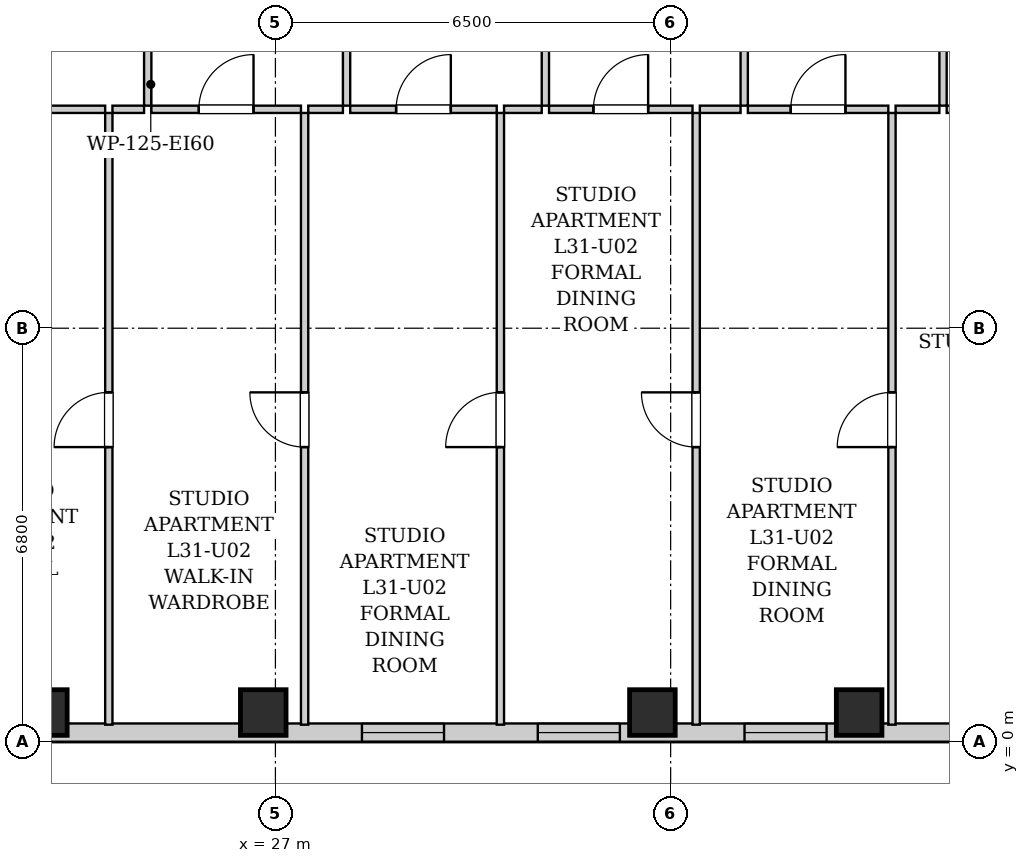
"""IFC4 building model, lengths in metres.
Left out: names, types, materials, properties, quantities, classifications, styles, units other than length and angle.
Written with IfcOpenShell. Run it as: python <this file> out.ifc"""

import sys

from ifc_helpers import new_model, si_unit, direction, frame, frame_2d, origin, origin_2d, place, context, subcontext, project, spatial, rectangle, extrude, element, fill, save


model = new_model("IFC4")
c1 = context("Model", 3, precision=1e-05, world=origin(), true_north=direction((0.0, 1.0)))
c2 = subcontext(c1, "Body", "Model", "MODEL_VIEW")
j1 = project(units=[si_unit("LENGTHUNIT", "METRE"), si_unit("PLANEANGLEUNIT", "RADIAN")], contexts=[c1])
p1 = place(None, origin())
s1 = spatial("IfcSite", under=j1, at=p1, CompositionType="ELEMENT")
p2 = place(p1, origin())
s2 = spatial("IfcBuilding", under=s1, at=p2, CompositionType="ELEMENT")
p3 = place(p2, frame((0.0, 0.0, 110.3)))
s3 = spatial("IfcBuildingStorey", under=s2, at=p3, CompositionType="ELEMENT", Elevation=110.3)
for number, where, z_axis, x_axis in (
    (1, (23.2, 0.48, 0.0), (0.0, 0.0, 1.0), (1.0, 0.0, 0.0)),
    (2, (26.8, 0.48, 0.0), (0.0, 0.0, 1.0), (1.0, 0.0, 0.0)),
    (3, (33.2, 0.48, 0.0), (0.0, 0.0, 1.0), (1.0, 0.0, 0.0)),
    (4, (36.6, 0.48, 0.0), (0.0, 0.0, 1.0), (1.0, 0.0, 0.0)),
):
    element("IfcColumn", number, at=place(p3, frame(where, z_axis=z_axis, x_axis=x_axis)), inside=s3, PredefinedType="COLUMN", context=c2, shape_type="SweptSolid", body=[
        extrude(rectangle(XDim=0.75, YDim=0.75, at=origin_2d()), origin(), (0.0, 0.0, 1.0), 3.2),
    ])
p4 = place(p3, frame((40.9, 0.15, 0.0), z_axis=(0.0, 0.0, 1.0), x_axis=(-1.0, 0.0, 0.0)))
e5 = element("IfcWall", 5, at=p4, inside=s3, PredefinedType="SOLIDWALL", context=c2, shape_type="SweptSolid", body=[
    extrude(rectangle(XDim=21.95, YDim=0.3, at=frame_2d((10.975, 0.0))), origin(), (0.0, 0.0, 1.0), 2.94),
])
p5 = place(p4, frame((20.08, 0.0, 0.55)))
e6 = element("IfcOpeningElement", 6, at=p5, cuts=e5, PredefinedType="OPENING", context=c2, shape_type="SweptSolid", body=[
    extrude(rectangle(XDim=1.35, YDim=1.2, at=frame_2d((0.675, 0.6))), frame((0.0, 0.16, 0.0), z_axis=(0.0, -1.0, 0.0), x_axis=(1.0, 0.0, 0.0)), (0.0, 0.0, 1.0), 0.32),
])
p6 = place(p4, frame((18.4, 0.0, 0.55)))
e7 = element("IfcOpeningElement", 7, at=p6, cuts=e5, PredefinedType="OPENING", context=c2, shape_type="SweptSolid", body=[
    extrude(rectangle(XDim=0.85, YDim=1.2, at=frame_2d((0.425, 0.6))), frame((0.0, 0.16, 0.0), z_axis=(0.0, -1.0, 0.0), x_axis=(1.0, 0.0, 0.0)), (0.0, 0.0, 1.0), 0.32),
])
p7 = place(p4, frame((11.127, 0.0, 0.55)))
e8 = element("IfcOpeningElement", 8, at=p7, cuts=e5, PredefinedType="OPENING", context=c2, shape_type="SweptSolid", body=[
    extrude(rectangle(XDim=1.35, YDim=1.2, at=frame_2d((0.675, 0.6))), frame((0.0, 0.16, 0.0), z_axis=(0.0, -1.0, 0.0), x_axis=(1.0, 0.0, 0.0)), (0.0, 0.0, 1.0), 0.32),
])
p8 = place(p4, frame((8.235, 0.0, 0.55)))
e9 = element("IfcOpeningElement", 9, at=p8, cuts=e5, PredefinedType="OPENING", context=c2, shape_type="SweptSolid", body=[
    extrude(rectangle(XDim=1.35, YDim=1.2, at=frame_2d((0.675, 0.6))), frame((0.0, 0.16, 0.0), z_axis=(0.0, -1.0, 0.0), x_axis=(1.0, 0.0, 0.0)), (0.0, 0.0, 1.0), 0.32),
])
p9 = place(p4, frame((4.835, 0.0, 0.55)))
e10 = element("IfcOpeningElement", 10, at=p9, cuts=e5, PredefinedType="OPENING", context=c2, shape_type="SweptSolid", body=[
    extrude(rectangle(XDim=1.35, YDim=1.2, at=frame_2d((0.675, 0.6))), frame((0.0, 0.16, 0.0), z_axis=(0.0, -1.0, 0.0), x_axis=(1.0, 0.0, 0.0)), (0.0, 0.0, 1.0), 0.32),
])
p10 = place(p3, frame((24.9, 10.46, 0.0), z_axis=(0.0, 0.0, 1.0), x_axis=(0.0, 1.0, 0.0)))
e11 = element("IfcWall", 11, at=p10, inside=s3, PredefinedType="PARTITIONING", context=c2, shape_type="SweptSolid", body=[
    extrude(rectangle(XDim=2.85, YDim=0.12, at=frame_2d((1.425, 0.0))), origin(), (0.0, 0.0, 1.0), 2.94),
])
p11 = place(p10, frame((0.975, 0.0, 0.0)))
e12 = element("IfcOpeningElement", 12, at=p11, cuts=e11, PredefinedType="OPENING", context=c2, shape_type="SweptSolid", body=[
    extrude(rectangle(XDim=0.9, YDim=2.05, at=frame_2d((0.45, 1.025))), frame((0.0, 0.07, 0.0), z_axis=(0.0, -1.0, 0.0), x_axis=(1.0, 0.0, 0.0)), (0.0, 0.0, 1.0), 0.14),
])
p12 = place(p3, frame((21.1, 10.4, 0.0), z_axis=(0.0, 0.0, 1.0), x_axis=(1.0, 0.0, 0.0)))
e13 = element("IfcWall", 13, at=p12, inside=s3, PredefinedType="PARTITIONING", context=c2, shape_type="SweptSolid", body=[
    extrude(rectangle(XDim=3.1, YDim=0.12, at=frame_2d((1.55, 0.0))), origin(), (0.0, 0.0, 1.0), 2.94),
])
p13 = place(p12, frame((1.1, 0.0, 0.0)))
e14 = element("IfcOpeningElement", 14, at=p13, cuts=e13, PredefinedType="OPENING", context=c2, shape_type="SweptSolid", body=[
    extrude(rectangle(XDim=0.9, YDim=2.05, at=frame_2d((0.45, 1.025))), frame((0.0, 0.07, 0.0), z_axis=(0.0, -1.0, 0.0), x_axis=(1.0, 0.0, 0.0)), (0.0, 0.0, 1.0), 0.14),
])
p14 = place(p3, frame((24.32, 10.4, 0.0), z_axis=(0.0, 0.0, 1.0), x_axis=(1.0, 0.0, 0.0)))
e15 = element("IfcWall", 15, at=p14, inside=s3, PredefinedType="PARTITIONING", context=c2, shape_type="SweptSolid", body=[
    extrude(rectangle(XDim=0.52, YDim=0.12, at=frame_2d((0.26, 0.0))), origin(), (0.0, 0.0, 1.0), 2.94),
])
p15 = place(p3, frame((28.17, 10.46, 0.0), z_axis=(0.0, 0.0, 1.0), x_axis=(0.0, 1.0, 0.0)))
e16 = element("IfcWall", 16, at=p15, inside=s3, PredefinedType="PARTITIONING", context=c2, shape_type="SweptSolid", body=[
    extrude(rectangle(XDim=2.85, YDim=0.12, at=frame_2d((1.425, 0.0))), origin(), (0.0, 0.0, 1.0), 2.94),
])
p16 = place(p15, frame((0.975, 0.0, 0.0)))
e17 = element("IfcOpeningElement", 17, at=p16, cuts=e16, PredefinedType="OPENING", context=c2, shape_type="SweptSolid", body=[
    extrude(rectangle(XDim=0.9, YDim=2.05, at=frame_2d((0.45, 1.025))), frame((0.0, 0.07, 0.0), z_axis=(0.0, -1.0, 0.0), x_axis=(1.0, 0.0, 0.0)), (0.0, 0.0, 1.0), 0.14),
])
p17 = place(p3, frame((24.96, 10.4, 0.0), z_axis=(0.0, 0.0, 1.0), x_axis=(1.0, 0.0, 0.0)))
e18 = element("IfcWall", 18, at=p17, inside=s3, PredefinedType="PARTITIONING", context=c2, shape_type="SweptSolid", body=[
    extrude(rectangle(XDim=2.46, YDim=0.12, at=frame_2d((1.23, 0.0))), origin(), (0.0, 0.0, 1.0), 2.94),
])
p18 = place(p17, frame((0.78, 0.0, 0.0)))
e19 = element("IfcOpeningElement", 19, at=p18, cuts=e18, PredefinedType="OPENING", context=c2, shape_type="SweptSolid", body=[
    extrude(rectangle(XDim=0.9, YDim=2.05, at=frame_2d((0.45, 1.025))), frame((0.0, 0.07, 0.0), z_axis=(0.0, -1.0, 0.0), x_axis=(1.0, 0.0, 0.0)), (0.0, 0.0, 1.0), 0.14),
])
p19 = place(p3, frame((27.54, 10.4, 0.0), z_axis=(0.0, 0.0, 1.0), x_axis=(1.0, 0.0, 0.0)))
e20 = element("IfcWall", 20, at=p19, inside=s3, PredefinedType="PARTITIONING", context=c2, shape_type="SweptSolid", body=[
    extrude(rectangle(XDim=0.57, YDim=0.12, at=frame_2d((0.285, 0.0))), origin(), (0.0, 0.0, 1.0), 2.94),
])
p20 = place(p3, frame((31.44, 10.46, 0.0), z_axis=(0.0, 0.0, 1.0), x_axis=(0.0, 1.0, 0.0)))
e21 = element("IfcWall", 21, at=p20, inside=s3, PredefinedType="PARTITIONING", context=c2, shape_type="SweptSolid", body=[
    extrude(rectangle(XDim=2.85, YDim=0.12, at=frame_2d((1.425, 0.0))), origin(), (0.0, 0.0, 1.0), 2.94),
])
p21 = place(p20, frame((0.975, 0.0, 0.0)))
e22 = element("IfcOpeningElement", 22, at=p21, cuts=e21, PredefinedType="OPENING", context=c2, shape_type="SweptSolid", body=[
    extrude(rectangle(XDim=0.9, YDim=2.05, at=frame_2d((0.45, 1.025))), frame((0.0, 0.07, 0.0), z_axis=(0.0, -1.0, 0.0), x_axis=(1.0, 0.0, 0.0)), (0.0, 0.0, 1.0), 0.14),
])
p22 = place(p3, frame((28.23, 10.4, 0.0), z_axis=(0.0, 0.0, 1.0), x_axis=(1.0, 0.0, 0.0)))
e23 = element("IfcWall", 23, at=p22, inside=s3, PredefinedType="PARTITIONING", context=c2, shape_type="SweptSolid", body=[
    extrude(rectangle(XDim=2.41, YDim=0.12, at=frame_2d((1.205, 0.0))), origin(), (0.0, 0.0, 1.0), 2.94),
])
p23 = place(p22, frame((0.755, 0.0, 0.0)))
e24 = element("IfcOpeningElement", 24, at=p23, cuts=e23, PredefinedType="OPENING", context=c2, shape_type="SweptSolid", body=[
    extrude(rectangle(XDim=0.9, YDim=2.05, at=frame_2d((0.45, 1.025))), frame((0.0, 0.07, 0.0), z_axis=(0.0, -1.0, 0.0), x_axis=(1.0, 0.0, 0.0)), (0.0, 0.0, 1.0), 0.14),
])
p24 = place(p3, frame((30.76, 10.4, 0.0), z_axis=(0.0, 0.0, 1.0), x_axis=(1.0, 0.0, 0.0)))
e25 = element("IfcWall", 25, at=p24, inside=s3, PredefinedType="PARTITIONING", context=c2, shape_type="SweptSolid", body=[
    extrude(rectangle(XDim=0.62, YDim=0.12, at=frame_2d((0.31, 0.0))), origin(), (0.0, 0.0, 1.0), 2.94),
])
p25 = place(p3, frame((34.71, 10.46, 0.0), z_axis=(0.0, 0.0, 1.0), x_axis=(0.0, 1.0, 0.0)))
e26 = element("IfcWall", 26, at=p25, inside=s3, PredefinedType="PARTITIONING", context=c2, shape_type="SweptSolid", body=[
    extrude(rectangle(XDim=2.85, YDim=0.12, at=frame_2d((1.425, 0.0))), origin(), (0.0, 0.0, 1.0), 2.94),
])
p26 = place(p25, frame((0.975, 0.0, 0.0)))
e27 = element("IfcOpeningElement", 27, at=p26, cuts=e26, PredefinedType="OPENING", context=c2, shape_type="SweptSolid", body=[
    extrude(rectangle(XDim=0.9, YDim=2.05, at=frame_2d((0.45, 1.025))), frame((0.0, 0.07, 0.0), z_axis=(0.0, -1.0, 0.0), x_axis=(1.0, 0.0, 0.0)), (0.0, 0.0, 1.0), 0.14),
])
p27 = place(p3, frame((31.5, 10.4, 0.0), z_axis=(0.0, 0.0, 1.0), x_axis=(1.0, 0.0, 0.0)))
e28 = element("IfcWall", 28, at=p27, inside=s3, PredefinedType="PARTITIONING", context=c2, shape_type="SweptSolid", body=[
    extrude(rectangle(XDim=2.36, YDim=0.12, at=frame_2d((1.18, 0.0))), origin(), (0.0, 0.0, 1.0), 2.94),
])
p28 = place(p27, frame((0.73, 0.0, 0.0)))
e29 = element("IfcOpeningElement", 29, at=p28, cuts=e28, PredefinedType="OPENING", context=c2, shape_type="SweptSolid", body=[
    extrude(rectangle(XDim=0.9, YDim=2.05, at=frame_2d((0.45, 1.025))), frame((0.0, 0.07, 0.0), z_axis=(0.0, -1.0, 0.0), x_axis=(1.0, 0.0, 0.0)), (0.0, 0.0, 1.0), 0.14),
])
p29 = place(p3, frame((33.98, 10.4, 0.0), z_axis=(0.0, 0.0, 1.0), x_axis=(1.0, 0.0, 0.0)))
e30 = element("IfcWall", 30, at=p29, inside=s3, PredefinedType="PARTITIONING", context=c2, shape_type="SweptSolid", body=[
    extrude(rectangle(XDim=0.67, YDim=0.12, at=frame_2d((0.335, 0.0))), origin(), (0.0, 0.0, 1.0), 2.94),
])
p30 = place(p3, frame((37.98, 10.46, 0.0), z_axis=(0.0, 0.0, 1.0), x_axis=(0.0, 1.0, 0.0)))
e31 = element("IfcWall", 31, at=p30, inside=s3, PredefinedType="PARTITIONING", context=c2, shape_type="SweptSolid", body=[
    extrude(rectangle(XDim=2.85, YDim=0.12, at=frame_2d((1.425, 0.0))), origin(), (0.0, 0.0, 1.0), 2.94),
])
p31 = place(p30, frame((0.975, 0.0, 0.0)))
e32 = element("IfcOpeningElement", 32, at=p31, cuts=e31, PredefinedType="OPENING", context=c2, shape_type="SweptSolid", body=[
    extrude(rectangle(XDim=0.9, YDim=2.05, at=frame_2d((0.45, 1.025))), frame((0.0, 0.07, 0.0), z_axis=(0.0, -1.0, 0.0), x_axis=(1.0, 0.0, 0.0)), (0.0, 0.0, 1.0), 0.14),
])
p32 = place(p3, frame((34.77, 10.4, 0.0), z_axis=(0.0, 0.0, 1.0), x_axis=(1.0, 0.0, 0.0)))
e33 = element("IfcWall", 33, at=p32, inside=s3, PredefinedType="PARTITIONING", context=c2, shape_type="SweptSolid", body=[
    extrude(rectangle(XDim=2.31, YDim=0.12, at=frame_2d((1.155, 0.0))), origin(), (0.0, 0.0, 1.0), 2.94),
])
p33 = place(p32, frame((0.705, 0.0, 0.0)))
e34 = element("IfcOpeningElement", 34, at=p33, cuts=e33, PredefinedType="OPENING", context=c2, shape_type="SweptSolid", body=[
    extrude(rectangle(XDim=0.9, YDim=2.05, at=frame_2d((0.45, 1.025))), frame((0.0, 0.07, 0.0), z_axis=(0.0, -1.0, 0.0), x_axis=(1.0, 0.0, 0.0)), (0.0, 0.0, 1.0), 0.14),
])
p34 = place(p3, frame((37.2, 10.4, 0.0), z_axis=(0.0, 0.0, 1.0), x_axis=(1.0, 0.0, 0.0)))
e35 = element("IfcWall", 35, at=p34, inside=s3, PredefinedType="PARTITIONING", context=c2, shape_type="SweptSolid", body=[
    extrude(rectangle(XDim=0.72, YDim=0.12, at=frame_2d((0.36, 0.0))), origin(), (0.0, 0.0, 1.0), 2.94),
])
p35 = place(p3, frame((38.04, 10.4, 0.0), z_axis=(0.0, 0.0, 1.0), x_axis=(1.0, 0.0, 0.0)))
e36 = element("IfcWall", 36, at=p35, inside=s3, PredefinedType="PARTITIONING", context=c2, shape_type="SweptSolid", body=[
    extrude(rectangle(XDim=2.78, YDim=0.12, at=frame_2d((1.39, 0.0))), origin(), (0.0, 0.0, 1.0), 2.94),
])
p36 = place(p35, frame((0.94, 0.0, 0.0)))
e37 = element("IfcOpeningElement", 37, at=p36, cuts=e36, PredefinedType="OPENING", context=c2, shape_type="SweptSolid", body=[
    extrude(rectangle(XDim=0.9, YDim=2.05, at=frame_2d((0.45, 1.025))), frame((0.0, 0.07, 0.0), z_axis=(0.0, -1.0, 0.0), x_axis=(1.0, 0.0, 0.0)), (0.0, 0.0, 1.0), 0.14),
])
p37 = place(p3, frame((24.26, 0.28, 0.0), z_axis=(0.0, 0.0, 1.0), x_axis=(0.0, 1.0, 0.0)))
e38 = element("IfcWall", 38, at=p37, inside=s3, PredefinedType="PARTITIONING", context=c2, shape_type="SweptSolid", body=[
    extrude(rectangle(XDim=10.06, YDim=0.12, at=frame_2d((5.03, 0.0))), origin(), (0.0, 0.0, 1.0), 2.94),
])
p38 = place(p37, frame((4.565, 0.0, 0.0)))
e39 = element("IfcOpeningElement", 39, at=p38, cuts=e38, PredefinedType="OPENING", context=c2, shape_type="SweptSolid", body=[
    extrude(rectangle(XDim=0.9, YDim=2.05, at=frame_2d((0.45, 1.025))), frame((0.0, 0.07, 0.0), z_axis=(0.0, -1.0, 0.0), x_axis=(1.0, 0.0, 0.0)), (0.0, 0.0, 1.0), 0.14),
])
p39 = place(p3, frame((27.48, 0.28, 0.0), z_axis=(0.0, 0.0, 1.0), x_axis=(0.0, 1.0, 0.0)))
e40 = element("IfcWall", 40, at=p39, inside=s3, PredefinedType="PARTITIONING", context=c2, shape_type="SweptSolid", body=[
    extrude(rectangle(XDim=10.06, YDim=0.12, at=frame_2d((5.03, 0.0))), origin(), (0.0, 0.0, 1.0), 2.94),
])
p40 = place(p39, frame((4.565, 0.0, 0.0)))
e41 = element("IfcOpeningElement", 41, at=p40, cuts=e40, PredefinedType="OPENING", context=c2, shape_type="SweptSolid", body=[
    extrude(rectangle(XDim=0.9, YDim=2.05, at=frame_2d((0.45, 1.025))), frame((0.0, 0.07, 0.0), z_axis=(0.0, -1.0, 0.0), x_axis=(1.0, 0.0, 0.0)), (0.0, 0.0, 1.0), 0.14),
])
p41 = place(p3, frame((30.7, 0.28, 0.0), z_axis=(0.0, 0.0, 1.0), x_axis=(0.0, 1.0, 0.0)))
e42 = element("IfcWall", 42, at=p41, inside=s3, PredefinedType="PARTITIONING", context=c2, shape_type="SweptSolid", body=[
    extrude(rectangle(XDim=10.06, YDim=0.12, at=frame_2d((5.03, 0.0))), origin(), (0.0, 0.0, 1.0), 2.94),
])
p42 = place(p41, frame((4.565, 0.0, 0.0)))
e43 = element("IfcOpeningElement", 43, at=p42, cuts=e42, PredefinedType="OPENING", context=c2, shape_type="SweptSolid", body=[
    extrude(rectangle(XDim=0.9, YDim=2.05, at=frame_2d((0.45, 1.025))), frame((0.0, 0.07, 0.0), z_axis=(0.0, -1.0, 0.0), x_axis=(1.0, 0.0, 0.0)), (0.0, 0.0, 1.0), 0.14),
])
p43 = place(p3, frame((33.92, 0.28, 0.0), z_axis=(0.0, 0.0, 1.0), x_axis=(0.0, 1.0, 0.0)))
e44 = element("IfcWall", 44, at=p43, inside=s3, PredefinedType="PARTITIONING", context=c2, shape_type="SweptSolid", body=[
    extrude(rectangle(XDim=10.06, YDim=0.12, at=frame_2d((5.03, 0.0))), origin(), (0.0, 0.0, 1.0), 2.94),
])
p44 = place(p43, frame((4.565, 0.0, 0.0)))
e45 = element("IfcOpeningElement", 45, at=p44, cuts=e44, PredefinedType="OPENING", context=c2, shape_type="SweptSolid", body=[
    extrude(rectangle(XDim=0.9, YDim=2.05, at=frame_2d((0.45, 1.025))), frame((0.0, 0.07, 0.0), z_axis=(0.0, -1.0, 0.0), x_axis=(1.0, 0.0, 0.0)), (0.0, 0.0, 1.0), 0.14),
])
p45 = place(p3, frame((37.14, 0.28, 0.0), z_axis=(0.0, 0.0, 1.0), x_axis=(0.0, 1.0, 0.0)))
e46 = element("IfcWall", 46, at=p45, inside=s3, PredefinedType="PARTITIONING", context=c2, shape_type="SweptSolid", body=[
    extrude(rectangle(XDim=10.06, YDim=0.12, at=frame_2d((5.03, 0.0))), origin(), (0.0, 0.0, 1.0), 2.94),
])
p46 = place(p45, frame((4.565, 0.0, 0.0)))
e47 = element("IfcOpeningElement", 47, at=p46, cuts=e46, PredefinedType="OPENING", context=c2, shape_type="SweptSolid", body=[
    extrude(rectangle(XDim=0.9, YDim=2.05, at=frame_2d((0.45, 1.025))), frame((0.0, 0.07, 0.0), z_axis=(0.0, -1.0, 0.0), x_axis=(1.0, 0.0, 0.0)), (0.0, 0.0, 1.0), 0.14),
])
p47 = place(p18, origin())
e48 = element("IfcDoor", 48, at=p47, inside=s3, OperationType="SINGLE_SWING_RIGHT", PredefinedType="DOOR", context=c2, shape_type="SweptSolid", body=[
    extrude(rectangle(XDim=0.9, YDim=2.05, at=frame_2d((0.45, 1.025))), frame((0.0, 0.025, 0.0), z_axis=(0.0, -1.0, 0.0), x_axis=(1.0, 0.0, 0.0)), (0.0, 0.0, 1.0), 0.05),
])
fill(e19, e48)
p48 = place(p23, origin())
e49 = element("IfcDoor", 49, at=p48, inside=s3, OperationType="SINGLE_SWING_RIGHT", PredefinedType="DOOR", context=c2, shape_type="SweptSolid", body=[
    extrude(rectangle(XDim=0.9, YDim=2.05, at=frame_2d((0.45, 1.025))), frame((0.0, 0.025, 0.0), z_axis=(0.0, -1.0, 0.0), x_axis=(1.0, 0.0, 0.0)), (0.0, 0.0, 1.0), 0.05),
])
fill(e24, e49)
p49 = place(p28, origin())
e50 = element("IfcDoor", 50, at=p49, inside=s3, OperationType="SINGLE_SWING_RIGHT", PredefinedType="DOOR", context=c2, shape_type="SweptSolid", body=[
    extrude(rectangle(XDim=0.9, YDim=2.05, at=frame_2d((0.45, 1.025))), frame((0.0, 0.025, 0.0), z_axis=(0.0, -1.0, 0.0), x_axis=(1.0, 0.0, 0.0)), (0.0, 0.0, 1.0), 0.05),
])
fill(e29, e50)
p50 = place(p33, origin())
e51 = element("IfcDoor", 51, at=p50, inside=s3, OperationType="SINGLE_SWING_RIGHT", PredefinedType="DOOR", context=c2, shape_type="SweptSolid", body=[
    extrude(rectangle(XDim=0.9, YDim=2.05, at=frame_2d((0.45, 1.025))), frame((0.0, 0.025, 0.0), z_axis=(0.0, -1.0, 0.0), x_axis=(1.0, 0.0, 0.0)), (0.0, 0.0, 1.0), 0.05),
])
fill(e34, e51)
p51 = place(p38, origin())
e52 = element("IfcDoor", 52, at=p51, inside=s3, OperationType="SINGLE_SWING_LEFT", PredefinedType="DOOR", context=c2, shape_type="SweptSolid", body=[
    extrude(rectangle(XDim=0.9, YDim=2.05, at=frame_2d((0.45, 1.025))), frame((0.0, 0.025, 0.0), z_axis=(0.0, -1.0, 0.0), x_axis=(1.0, 0.0, 0.0)), (0.0, 0.0, 1.0), 0.05),
])
fill(e39, e52)
p52 = place(p40, origin())
e53 = element("IfcDoor", 53, at=p52, inside=s3, OperationType="SINGLE_SWING_RIGHT", PredefinedType="DOOR", context=c2, shape_type="SweptSolid", body=[
    extrude(rectangle(XDim=0.9, YDim=2.05, at=frame_2d((0.45, 1.025))), frame((0.0, 0.025, 0.0), z_axis=(0.0, -1.0, 0.0), x_axis=(1.0, 0.0, 0.0)), (0.0, 0.0, 1.0), 0.05),
])
fill(e41, e53)
p53 = place(p42, origin())
e54 = element("IfcDoor", 54, at=p53, inside=s3, OperationType="SINGLE_SWING_LEFT", PredefinedType="DOOR", context=c2, shape_type="SweptSolid", body=[
    extrude(rectangle(XDim=0.9, YDim=2.05, at=frame_2d((0.45, 1.025))), frame((0.0, 0.025, 0.0), z_axis=(0.0, -1.0, 0.0), x_axis=(1.0, 0.0, 0.0)), (0.0, 0.0, 1.0), 0.05),
])
fill(e43, e54)
p54 = place(p44, origin())
e55 = element("IfcDoor", 55, at=p54, inside=s3, OperationType="SINGLE_SWING_RIGHT", PredefinedType="DOOR", context=c2, shape_type="SweptSolid", body=[
    extrude(rectangle(XDim=0.9, YDim=2.05, at=frame_2d((0.45, 1.025))), frame((0.0, 0.025, 0.0), z_axis=(0.0, -1.0, 0.0), x_axis=(1.0, 0.0, 0.0)), (0.0, 0.0, 1.0), 0.05),
])
fill(e45, e55)
p55 = place(p46, origin())
e56 = element("IfcDoor", 56, at=p55, inside=s3, OperationType="SINGLE_SWING_LEFT", PredefinedType="DOOR", context=c2, shape_type="SweptSolid", body=[
    extrude(rectangle(XDim=0.9, YDim=2.05, at=frame_2d((0.45, 1.025))), frame((0.0, 0.025, 0.0), z_axis=(0.0, -1.0, 0.0), x_axis=(1.0, 0.0, 0.0)), (0.0, 0.0, 1.0), 0.05),
])
fill(e47, e56)
p56 = place(p7, origin())
e57 = element("IfcWindow", 57, at=p56, inside=s3, PartitioningType="SINGLE_PANEL", PredefinedType="WINDOW", context=c2, shape_type="SweptSolid", body=[
    extrude(rectangle(XDim=1.35, YDim=1.2, at=frame_2d((0.675, 0.6))), frame((0.0, 0.03, 0.0), z_axis=(0.0, -1.0, 0.0), x_axis=(1.0, 0.0, 0.0)), (0.0, 0.0, 1.0), 0.06),
])
fill(e8, e57)
p57 = place(p8, origin())
e58 = element("IfcWindow", 58, at=p57, inside=s3, PartitioningType="SINGLE_PANEL", PredefinedType="WINDOW", context=c2, shape_type="SweptSolid", body=[
    extrude(rectangle(XDim=1.35, YDim=1.2, at=frame_2d((0.675, 0.6))), frame((0.0, 0.03, 0.0), z_axis=(0.0, -1.0, 0.0), x_axis=(1.0, 0.0, 0.0)), (0.0, 0.0, 1.0), 0.06),
])
fill(e9, e58)
p58 = place(p9, origin())
e59 = element("IfcWindow", 59, at=p58, inside=s3, PartitioningType="SINGLE_PANEL", PredefinedType="WINDOW", context=c2, shape_type="SweptSolid", body=[
    extrude(rectangle(XDim=1.35, YDim=1.2, at=frame_2d((0.675, 0.6))), frame((0.0, 0.03, 0.0), z_axis=(0.0, -1.0, 0.0), x_axis=(1.0, 0.0, 0.0)), (0.0, 0.0, 1.0), 0.06),
])
fill(e10, e59)
save(model, sys.argv[1])
